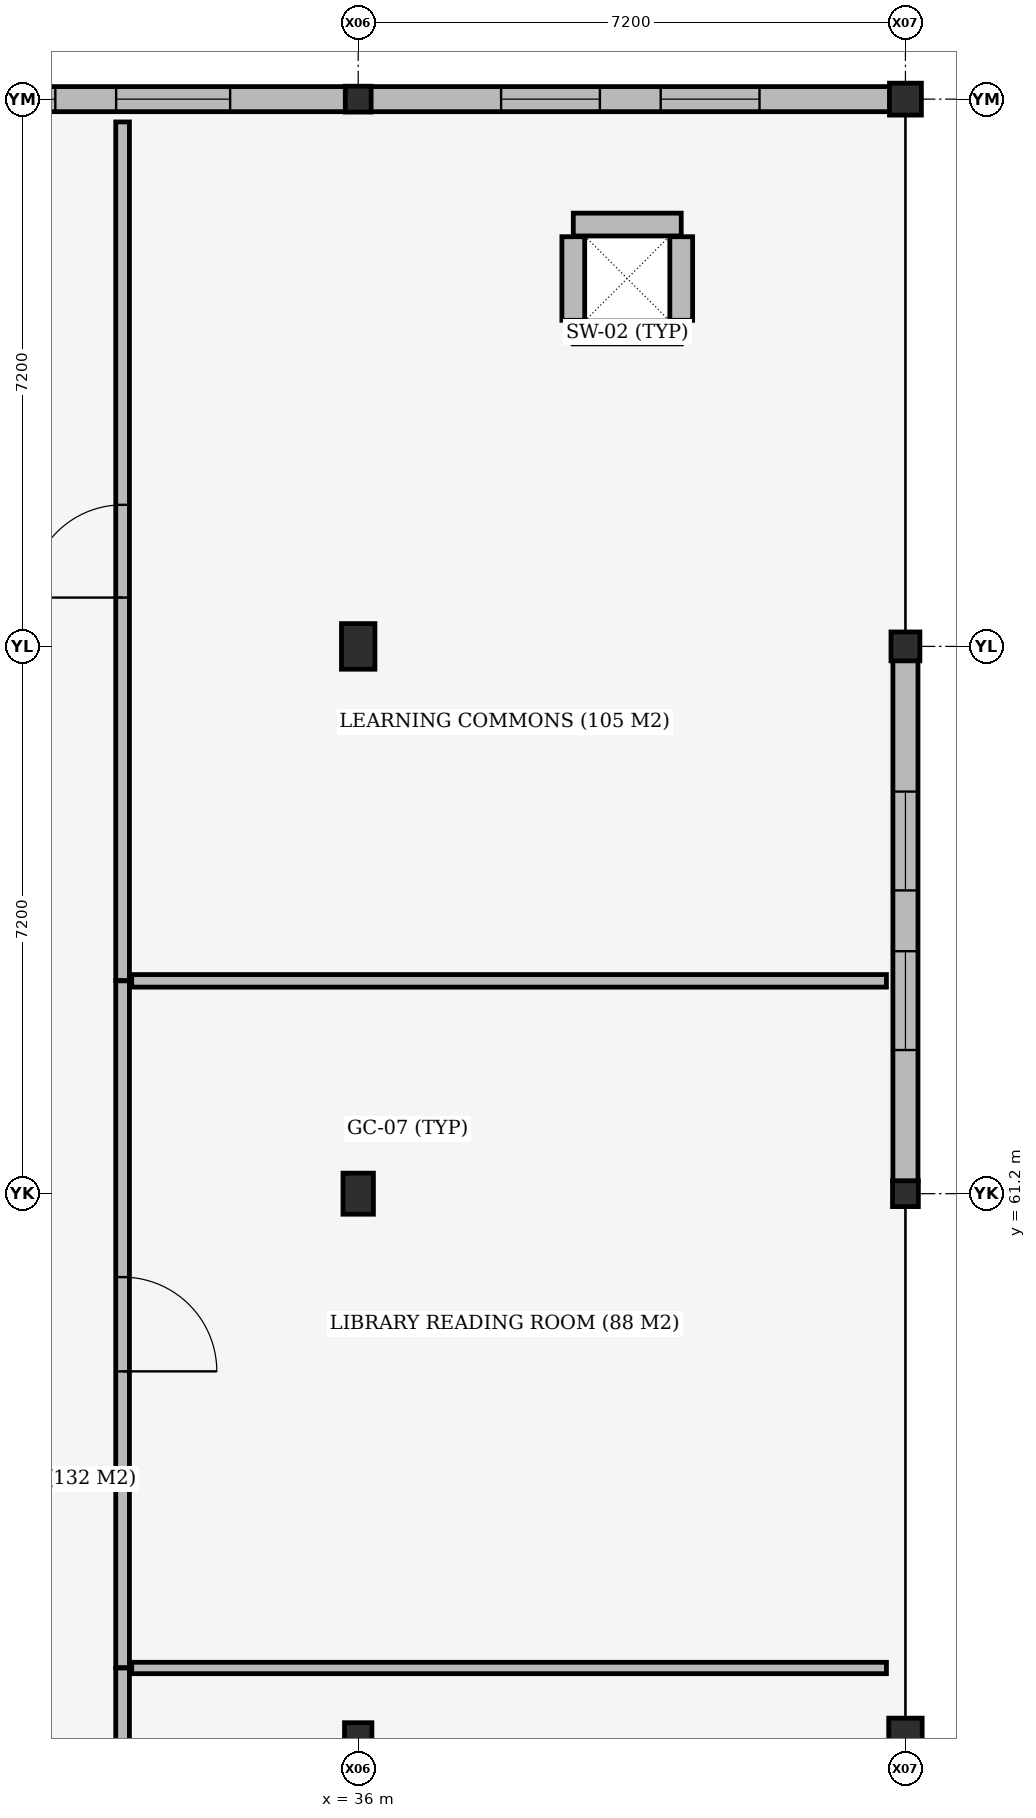
"""IFC4 building model, lengths in metres.
Left out: names, types, materials, properties, quantities, classifications, styles, units other than length and angle.
Written with IfcOpenShell. Run it as: python <this file> out.ifc"""

import sys

from ifc_helpers import new_model, si_unit, direction, frame, frame_2d, origin, origin_2d, place, context, subcontext, project, spatial, rectangle, extrude, element, fill, save


model = new_model("IFC4")
c1 = context("Model", 3, precision=1e-05, world=origin(), true_north=direction((0.0, 1.0)))
c2 = subcontext(c1, "Body", "Model", "MODEL_VIEW")
j1 = project(units=[si_unit("LENGTHUNIT", "METRE"), si_unit("PLANEANGLEUNIT", "RADIAN")], contexts=[c1])
p1 = place(None, origin())
s1 = spatial("IfcSite", under=j1, at=p1, CompositionType="ELEMENT")
p2 = place(p1, origin())
s2 = spatial("IfcBuilding", under=s1, at=p2, CompositionType="ELEMENT")
p3 = place(p2, frame((0.0, 0.0, 18.0)))
s3 = spatial("IfcBuildingStorey", under=s2, at=p3, CompositionType="ELEMENT", Elevation=18.0)
p4 = place(p3, frame((38.83, 72.53, 0.0), z_axis=(0.0, 0.0, 1.0), x_axis=(1.0, 0.0, 0.0)))
e1 = element("IfcWall", 1, at=p4, inside=s3, PredefinedType="SHEAR", context=c2, shape_type="SweptSolid", body=[
    extrude(rectangle(XDim=1.42, YDim=0.3, at=frame_2d((0.71, 0.0))), origin(), (0.0, 0.0, 1.0), 3.96),
])
p5 = place(p3, frame((40.25, 72.69, 0.0), z_axis=(0.0, 0.0, 1.0), x_axis=(0.0, 1.0, 0.0)))
e2 = element("IfcWall", 2, at=p5, inside=s3, PredefinedType="SHEAR", context=c2, shape_type="SweptSolid", body=[
    extrude(rectangle(XDim=1.1, YDim=0.3, at=frame_2d((0.55, 0.0))), origin(), (0.0, 0.0, 1.0), 3.96),
])
p6 = place(p3, frame((40.25, 73.95, 0.0), z_axis=(0.0, 0.0, 1.0), x_axis=(-1.0, 0.0, 0.0)))
e3 = element("IfcWall", 3, at=p6, inside=s3, PredefinedType="SHEAR", context=c2, shape_type="SweptSolid", body=[
    extrude(rectangle(XDim=1.42, YDim=0.3, at=frame_2d((0.71, 0.0))), origin(), (0.0, 0.0, 1.0), 3.96),
])
p7 = place(p3, frame((38.83, 73.79, 0.0), z_axis=(0.0, 0.0, 1.0), x_axis=(0.0, -1.0, 0.0)))
e4 = element("IfcWall", 4, at=p7, inside=s3, PredefinedType="SHEAR", context=c2, shape_type="SweptSolid", body=[
    extrude(rectangle(XDim=1.1, YDim=0.3, at=frame_2d((0.55, 0.0))), origin(), (0.0, 0.0, 1.0), 3.96),
])
p8 = place(p3, frame((36.0, 54.0, 0.0), z_axis=(0.0, 0.0, 1.0), x_axis=(1.0, 0.0, 0.0)))
e5 = element("IfcColumn", 5, at=p8, inside=s3, PredefinedType="COLUMN", context=c2, shape_type="SweptSolid", body=[
    extrude(rectangle(XDim=0.36, YDim=0.48, at=origin_2d()), origin(), (0.0, 0.0, 1.0), 3.935),
])
p9 = place(p3, frame((36.0, 61.2, 0.0), z_axis=(0.0, 0.0, 1.0), x_axis=(1.0, 0.0, 0.0)))
e6 = element("IfcColumn", 6, at=p9, inside=s3, PredefinedType="COLUMN", context=c2, shape_type="SweptSolid", body=[
    extrude(rectangle(XDim=0.4, YDim=0.54, at=origin_2d()), origin(), (0.0, 0.0, 1.0), 3.935),
])
p10 = place(p3, frame((36.0, 68.4, 0.0), z_axis=(0.0, 0.0, 1.0), x_axis=(1.0, 0.0, 0.0)))
e7 = element("IfcColumn", 7, at=p10, inside=s3, PredefinedType="COLUMN", context=c2, shape_type="SweptSolid", body=[
    extrude(rectangle(XDim=0.44, YDim=0.6, at=origin_2d()), origin(), (0.0, 0.0, 1.0), 3.96),
])
p11 = place(p3, frame((36.0, 75.6, 0.0), z_axis=(0.0, 0.0, 1.0), x_axis=(1.0, 0.0, 0.0)))
e8 = element("IfcColumn", 8, at=p11, inside=s3, PredefinedType="COLUMN", context=c2, shape_type="SweptSolid", body=[
    extrude(rectangle(XDim=0.34, YDim=0.34, at=origin_2d()), origin(), (0.0, 0.0, 1.0), 3.96),
])
p12 = place(p3, frame((43.2, 54.0, 0.0), z_axis=(0.0, 0.0, 1.0), x_axis=(1.0, 0.0, 0.0)))
e9 = element("IfcColumn", 9, at=p12, inside=s3, PredefinedType="COLUMN", context=c2, shape_type="SweptSolid", body=[
    extrude(rectangle(XDim=0.44, YDim=0.6, at=origin_2d()), origin(), (0.0, 0.0, 1.0), 3.96),
])
p13 = place(p3, frame((43.2, 61.2, 0.0), z_axis=(0.0, 0.0, 1.0), x_axis=(1.0, 0.0, 0.0)))
e10 = element("IfcColumn", 10, at=p13, inside=s3, PredefinedType="COLUMN", context=c2, shape_type="SweptSolid", body=[
    extrude(rectangle(XDim=0.34, YDim=0.34, at=origin_2d()), origin(), (0.0, 0.0, 1.0), 3.96),
])
p14 = place(p3, frame((43.2, 68.4, 0.0), z_axis=(0.0, 0.0, 1.0), x_axis=(1.0, 0.0, 0.0)))
e11 = element("IfcColumn", 11, at=p14, inside=s3, PredefinedType="COLUMN", context=c2, shape_type="SweptSolid", body=[
    extrude(rectangle(XDim=0.38, YDim=0.38, at=origin_2d()), origin(), (0.0, 0.0, 1.0), 3.96),
])
p15 = place(p3, frame((43.2, 75.6, 0.0), z_axis=(0.0, 0.0, 1.0), x_axis=(1.0, 0.0, 0.0)))
e12 = element("IfcColumn", 12, at=p15, inside=s3, PredefinedType="COLUMN", context=c2, shape_type="SweptSolid", body=[
    extrude(rectangle(XDim=0.42, YDim=0.42, at=origin_2d()), origin(), (0.0, 0.0, 1.0), 3.96),
])
p16 = place(p3, frame((28.992, 75.6, 0.0), z_axis=(0.0, 0.0, 1.0), x_axis=(1.0, 0.0, 0.0)))
e13 = element("IfcWall", 13, at=p16, inside=s3, PredefinedType="STANDARD", context=c2, shape_type="SweptSolid", body=[
    extrude(rectangle(XDim=6.846, YDim=0.33, at=frame_2d((3.423, 0.0))), origin(), (0.0, 0.0, 1.0), 3.935),
])
p17 = place(p16, frame((1.523, 0.0, 0.95)))
e14 = element("IfcOpeningElement", 14, at=p17, cuts=e13, PredefinedType="OPENING", context=c2, shape_type="SweptSolid", body=[
    extrude(rectangle(XDim=1.5, YDim=1.8, at=frame_2d((0.75, 0.9))), frame((0.0, 0.175, 0.0), z_axis=(0.0, -1.0, 0.0), x_axis=(1.0, 0.0, 0.0)), (0.0, 0.0, 1.0), 0.35),
])
p18 = place(p16, frame((3.823, 0.0, 0.95)))
e15 = element("IfcOpeningElement", 15, at=p18, cuts=e13, PredefinedType="OPENING", context=c2, shape_type="SweptSolid", body=[
    extrude(rectangle(XDim=1.5, YDim=1.8, at=frame_2d((0.75, 0.9))), frame((0.0, 0.175, 0.0), z_axis=(0.0, -1.0, 0.0), x_axis=(1.0, 0.0, 0.0)), (0.0, 0.0, 1.0), 0.35),
])
p19 = place(p3, frame((36.162, 75.6, 0.0), z_axis=(0.0, 0.0, 1.0), x_axis=(1.0, 0.0, 0.0)))
e16 = element("IfcWall", 16, at=p19, inside=s3, PredefinedType="STANDARD", context=c2, shape_type="SweptSolid", body=[
    extrude(rectangle(XDim=6.836, YDim=0.33, at=frame_2d((3.418, 0.0))), origin(), (0.0, 0.0, 1.0), 3.935),
])
p20 = place(p19, frame((1.718, 0.0, 0.95)))
e17 = element("IfcOpeningElement", 17, at=p20, cuts=e16, PredefinedType="OPENING", context=c2, shape_type="SweptSolid", body=[
    extrude(rectangle(XDim=1.3, YDim=1.8, at=frame_2d((0.65, 0.9))), frame((0.0, 0.175, 0.0), z_axis=(0.0, -1.0, 0.0), x_axis=(1.0, 0.0, 0.0)), (0.0, 0.0, 1.0), 0.35),
])
p21 = place(p19, frame((3.818, 0.0, 0.95)))
e18 = element("IfcOpeningElement", 18, at=p21, cuts=e16, PredefinedType="OPENING", context=c2, shape_type="SweptSolid", body=[
    extrude(rectangle(XDim=1.3, YDim=1.8, at=frame_2d((0.65, 0.9))), frame((0.0, 0.175, 0.0), z_axis=(0.0, -1.0, 0.0), x_axis=(1.0, 0.0, 0.0)), (0.0, 0.0, 1.0), 0.35),
])
p22 = place(p3, frame((43.2, 68.218, 0.0), z_axis=(0.0, 0.0, 1.0), x_axis=(0.0, -1.0, 0.0)))
e19 = element("IfcWall", 19, at=p22, inside=s3, PredefinedType="STANDARD", context=c2, shape_type="SweptSolid", body=[
    extrude(rectangle(XDim=6.856, YDim=0.33, at=frame_2d((3.428, 0.0))), origin(), (0.0, 0.0, 1.0), 3.935),
])
p23 = place(p22, frame((1.728, 0.0, 0.95)))
e20 = element("IfcOpeningElement", 20, at=p23, cuts=e19, PredefinedType="OPENING", context=c2, shape_type="SweptSolid", body=[
    extrude(rectangle(XDim=1.3, YDim=1.8, at=frame_2d((0.65, 0.9))), frame((0.0, 0.175, 0.0), z_axis=(0.0, -1.0, 0.0), x_axis=(1.0, 0.0, 0.0)), (0.0, 0.0, 1.0), 0.35),
])
p24 = place(p22, frame((3.828, 0.0, 0.95)))
e21 = element("IfcOpeningElement", 21, at=p24, cuts=e19, PredefinedType="OPENING", context=c2, shape_type="SweptSolid", body=[
    extrude(rectangle(XDim=1.3, YDim=1.8, at=frame_2d((0.65, 0.9))), frame((0.0, 0.175, 0.0), z_axis=(0.0, -1.0, 0.0), x_axis=(1.0, 0.0, 0.0)), (0.0, 0.0, 1.0), 0.35),
])
p25 = place(p3, frame((32.9, 41.405, 0.0), z_axis=(0.0, 0.0, 1.0), x_axis=(0.0, 1.0, 0.0)))
e22 = element("IfcWall", 22, at=p25, inside=s3, PredefinedType="PARTITIONING", context=c2, shape_type="SweptSolid", body=[
    extrude(rectangle(XDim=13.555, YDim=0.18, at=frame_2d((6.777, 0.0))), origin(), (0.0, 0.0, 1.0), 3.195),
])
p26 = place(p25, frame((6.167, 0.0, 0.0)))
e23 = element("IfcOpeningElement", 23, at=p26, cuts=e22, PredefinedType="OPENING", context=c2, shape_type="SweptSolid", body=[
    extrude(rectangle(XDim=1.22, YDim=2.25, at=frame_2d((0.61, 1.125))), frame((0.0, 0.1, 0.0), z_axis=(0.0, -1.0, 0.0), x_axis=(1.0, 0.0, 0.0)), (0.0, 0.0, 1.0), 0.2),
])
p27 = place(p3, frame((33.02, 54.96, 0.0), z_axis=(0.0, 0.0, 1.0), x_axis=(1.0, 0.0, 0.0)))
e24 = element("IfcWall", 24, at=p27, inside=s3, PredefinedType="PARTITIONING", context=c2, shape_type="SweptSolid", body=[
    extrude(rectangle(XDim=9.93, YDim=0.15, at=frame_2d((4.965, 0.0))), origin(), (0.0, 0.0, 1.0), 3.295),
])
p28 = place(p3, frame((32.9, 54.965, 0.0), z_axis=(0.0, 0.0, 1.0), x_axis=(0.0, 1.0, 0.0)))
e25 = element("IfcWall", 25, at=p28, inside=s3, PredefinedType="PARTITIONING", context=c2, shape_type="SweptSolid", body=[
    extrude(rectangle(XDim=9.035, YDim=0.18, at=frame_2d((4.518, 0.0))), origin(), (0.0, 0.0, 1.0), 3.415),
])
p29 = place(p28, frame((3.897, 0.0, 0.0)))
e26 = element("IfcOpeningElement", 26, at=p29, cuts=e25, PredefinedType="OPENING", context=c2, shape_type="SweptSolid", body=[
    extrude(rectangle(XDim=1.24, YDim=2.25, at=frame_2d((0.62, 1.125))), frame((0.0, 0.1, 0.0), z_axis=(0.0, -1.0, 0.0), x_axis=(1.0, 0.0, 0.0)), (0.0, 0.0, 1.0), 0.2),
])
p30 = place(p3, frame((33.02, 64.0, 0.0), z_axis=(0.0, 0.0, 1.0), x_axis=(1.0, 0.0, 0.0)))
e27 = element("IfcWall", 27, at=p30, inside=s3, PredefinedType="PARTITIONING", context=c2, shape_type="SweptSolid", body=[
    extrude(rectangle(XDim=9.93, YDim=0.165, at=frame_2d((4.965, 0.0))), origin(), (0.0, 0.0, 1.0), 3.935),
])
p31 = place(p3, frame((32.9, 64.005, 0.0), z_axis=(0.0, 0.0, 1.0), x_axis=(0.0, 1.0, 0.0)))
e28 = element("IfcWall", 28, at=p31, inside=s3, PredefinedType="PARTITIONING", context=c2, shape_type="SweptSolid", body=[
    extrude(rectangle(XDim=11.295, YDim=0.18, at=frame_2d((5.647, 0.0))), origin(), (0.0, 0.0, 1.0), 3.935),
])
p32 = place(p31, frame((5.038, 0.0, 0.0)))
e29 = element("IfcOpeningElement", 29, at=p32, cuts=e28, PredefinedType="OPENING", context=c2, shape_type="SweptSolid", body=[
    extrude(rectangle(XDim=1.22, YDim=2.25, at=frame_2d((0.61, 1.125))), frame((0.0, 0.1, 0.0), z_axis=(0.0, -1.0, 0.0), x_axis=(1.0, 0.0, 0.0)), (0.0, 0.0, 1.0), 0.2),
])
p33 = place(p17, origin())
e30 = element("IfcWindow", 30, at=p33, inside=s3, PartitioningType="DOUBLE_PANEL_VERTICAL", PredefinedType="WINDOW", context=c2, shape_type="SweptSolid", body=[
    extrude(rectangle(XDim=1.5, YDim=1.8, at=frame_2d((0.75, 0.9))), frame((0.0, 0.03, 0.0), z_axis=(0.0, -1.0, 0.0), x_axis=(1.0, 0.0, 0.0)), (0.0, 0.0, 1.0), 0.06),
])
fill(e14, e30)
p34 = place(p18, origin())
e31 = element("IfcWindow", 31, at=p34, inside=s3, PartitioningType="DOUBLE_PANEL_VERTICAL", PredefinedType="WINDOW", context=c2, shape_type="SweptSolid", body=[
    extrude(rectangle(XDim=1.5, YDim=1.8, at=frame_2d((0.75, 0.9))), frame((0.0, 0.03, 0.0), z_axis=(0.0, -1.0, 0.0), x_axis=(1.0, 0.0, 0.0)), (0.0, 0.0, 1.0), 0.06),
])
fill(e15, e31)
p35 = place(p20, origin())
e32 = element("IfcWindow", 32, at=p35, inside=s3, PartitioningType="DOUBLE_PANEL_VERTICAL", PredefinedType="WINDOW", context=c2, shape_type="SweptSolid", body=[
    extrude(rectangle(XDim=1.3, YDim=1.8, at=frame_2d((0.65, 0.9))), frame((0.0, 0.03, 0.0), z_axis=(0.0, -1.0, 0.0), x_axis=(1.0, 0.0, 0.0)), (0.0, 0.0, 1.0), 0.06),
])
fill(e17, e32)
p36 = place(p21, origin())
e33 = element("IfcWindow", 33, at=p36, inside=s3, PartitioningType="DOUBLE_PANEL_VERTICAL", PredefinedType="WINDOW", context=c2, shape_type="SweptSolid", body=[
    extrude(rectangle(XDim=1.3, YDim=1.8, at=frame_2d((0.65, 0.9))), frame((0.0, 0.03, 0.0), z_axis=(0.0, -1.0, 0.0), x_axis=(1.0, 0.0, 0.0)), (0.0, 0.0, 1.0), 0.06),
])
fill(e18, e33)
p37 = place(p23, origin())
e34 = element("IfcWindow", 34, at=p37, inside=s3, PartitioningType="DOUBLE_PANEL_VERTICAL", PredefinedType="WINDOW", context=c2, shape_type="SweptSolid", body=[
    extrude(rectangle(XDim=1.3, YDim=1.8, at=frame_2d((0.65, 0.9))), frame((0.0, 0.03, 0.0), z_axis=(0.0, -1.0, 0.0), x_axis=(1.0, 0.0, 0.0)), (0.0, 0.0, 1.0), 0.06),
])
fill(e20, e34)
p38 = place(p24, origin())
e35 = element("IfcWindow", 35, at=p38, inside=s3, PartitioningType="DOUBLE_PANEL_VERTICAL", PredefinedType="WINDOW", context=c2, shape_type="SweptSolid", body=[
    extrude(rectangle(XDim=1.3, YDim=1.8, at=frame_2d((0.65, 0.9))), frame((0.0, 0.03, 0.0), z_axis=(0.0, -1.0, 0.0), x_axis=(1.0, 0.0, 0.0)), (0.0, 0.0, 1.0), 0.06),
])
fill(e21, e35)
p39 = place(p29, origin())
e36 = element("IfcDoor", 36, at=p39, inside=s3, OperationType="SINGLE_SWING_RIGHT", PredefinedType="DOOR", context=c2, shape_type="SweptSolid", body=[
    extrude(rectangle(XDim=1.24, YDim=2.25, at=frame_2d((0.62, 1.125))), frame((0.0, 0.025, 0.0), z_axis=(0.0, -1.0, 0.0), x_axis=(1.0, 0.0, 0.0)), (0.0, 0.0, 1.0), 0.05),
])
fill(e26, e36)
p40 = place(p32, origin())
e37 = element("IfcDoor", 37, at=p40, inside=s3, OperationType="SINGLE_SWING_LEFT", PredefinedType="DOOR", context=c2, shape_type="SweptSolid", body=[
    extrude(rectangle(XDim=1.22, YDim=2.25, at=frame_2d((0.61, 1.125))), frame((0.0, 0.025, 0.0), z_axis=(0.0, -1.0, 0.0), x_axis=(1.0, 0.0, 0.0)), (0.0, 0.0, 1.0), 0.05),
])
fill(e29, e37)
save(model, sys.argv[1])
